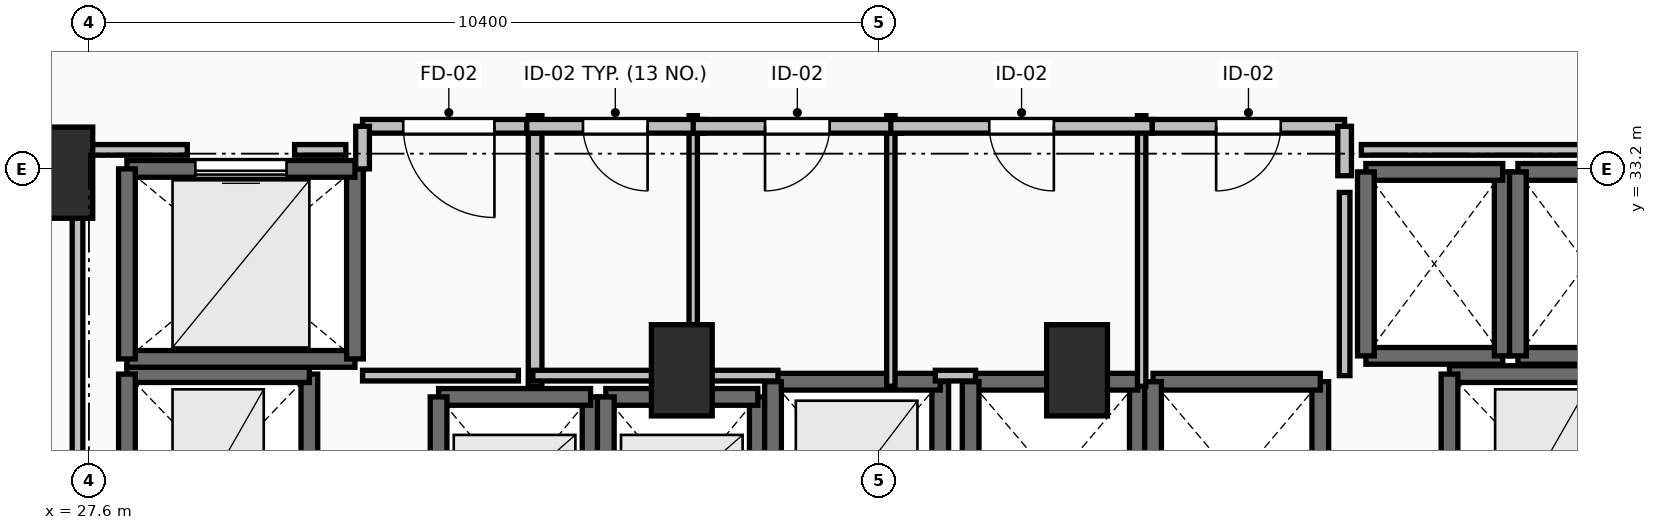
"""IFC4 building model, lengths in metres.
Left out: names, types, materials, properties, quantities, classifications, styles, units other than length and angle.
Written with IfcOpenShell. Run it as: python <this file> out.ifc"""

import sys

from ifc_helpers import new_model, si_unit, direction, frame, frame_2d, origin, origin_2d, place, context, subcontext, project, spatial, rectangle, extrude, element, fill, save


model = new_model("IFC4")
c1 = context("Model", 3, precision=1e-05, world=origin(), true_north=direction((0.0, 1.0)))
c2 = subcontext(c1, "Body", "Model", "MODEL_VIEW")
j1 = project(units=[si_unit("LENGTHUNIT", "METRE"), si_unit("PLANEANGLEUNIT", "RADIAN")], contexts=[c1])
p1 = place(None, origin())
s1 = spatial("IfcSite", under=j1, at=p1, CompositionType="ELEMENT")
p2 = place(p1, origin())
s2 = spatial("IfcBuilding", under=s1, at=p2, CompositionType="ELEMENT")
p3 = place(p2, frame((0.0, 0.0, 99.8)))
s3 = spatial("IfcBuildingStorey", under=s2, at=p3, CompositionType="ELEMENT", Elevation=99.8)
for number, where, z_axis, x_axis in (
    (1, (27.25, 33.15, 0.0), (0.0, 0.0, 1.0), (1.0, 0.0, 0.0)),
    (2, (35.4, 30.55, 0.0), (0.0, 0.0, 1.0), (1.0, 0.0, 0.0)),
    (3, (40.6, 30.55, 0.0), (0.0, 0.0, 1.0), (1.0, 0.0, 0.0)),
):
    element("IfcColumn", number, at=place(p3, frame(where, z_axis=z_axis, x_axis=x_axis)), inside=s3, PredefinedType="PILASTER", context=c2, shape_type="SweptSolid", body=[
        extrude(rectangle(XDim=0.8, YDim=1.2, at=origin_2d()), origin(), (0.0, 0.0, 1.0), 3.5),
    ])
p4 = place(p3, frame((34.2, 27.8, 0.0), z_axis=(0.0, 0.0, 1.0), x_axis=(0.0, 1.0, 0.0)))
e4 = element("IfcWall", 4, at=p4, inside=s3, PredefinedType="SOLIDWALL", context=c2, shape_type="SweptSolid", body=[
    extrude(rectangle(XDim=2.4, YDim=0.22, at=frame_2d((1.2, 0.0))), origin(), (0.0, 0.0, 1.0), 3.24),
])
p5 = place(p3, frame((34.2, 30.2, 0.0), z_axis=(0.0, 0.0, 1.0), x_axis=(-1.0, 0.0, 0.0)))
e5 = element("IfcWall", 5, at=p5, inside=s3, PredefinedType="SOLIDWALL", context=c2, shape_type="SweptSolid", body=[
    extrude(rectangle(XDim=2.0, YDim=0.22, at=frame_2d((1.0, 0.0))), origin(), (0.0, 0.0, 1.0), 3.24),
])
for number, where, z_axis, x_axis in (
    (6, (32.2, 30.2, 0.0), (0.0, 0.0, 1.0), (0.0, -1.0, 0.0)),
    (7, (36.4, 27.8, 0.0), (0.0, 0.0, 1.0), (0.0, 1.0, 0.0)),
):
    element("IfcWall", number, at=place(p3, frame(where, z_axis=z_axis, x_axis=x_axis)), inside=s3, PredefinedType="SOLIDWALL", context=c2, shape_type="SweptSolid", body=[
        extrude(rectangle(XDim=2.4, YDim=0.22, at=frame_2d((1.2, 0.0))), origin(), (0.0, 0.0, 1.0), 3.24),
    ])
p6 = place(p3, frame((36.4, 30.2, 0.0), z_axis=(0.0, 0.0, 1.0), x_axis=(-1.0, 0.0, 0.0)))
e8 = element("IfcWall", 8, at=p6, inside=s3, PredefinedType="SOLIDWALL", context=c2, shape_type="SweptSolid", body=[
    extrude(rectangle(XDim=2.0, YDim=0.22, at=frame_2d((1.0, 0.0))), origin(), (0.0, 0.0, 1.0), 3.24),
])
p7 = place(p3, frame((34.4, 30.2, 0.0), z_axis=(0.0, 0.0, 1.0), x_axis=(0.0, -1.0, 0.0)))
e9 = element("IfcWall", 9, at=p7, inside=s3, PredefinedType="SOLIDWALL", context=c2, shape_type="SweptSolid", body=[
    extrude(rectangle(XDim=2.4, YDim=0.22, at=frame_2d((1.2, 0.0))), origin(), (0.0, 0.0, 1.0), 3.24),
])
p8 = place(p3, frame((38.8, 27.8, 0.0), z_axis=(0.0, 0.0, 1.0), x_axis=(0.0, 1.0, 0.0)))
e10 = element("IfcWall", 10, at=p8, inside=s3, PredefinedType="SOLIDWALL", context=c2, shape_type="SweptSolid", body=[
    extrude(rectangle(XDim=2.6, YDim=0.22, at=frame_2d((1.3, 0.0))), origin(), (0.0, 0.0, 1.0), 3.24),
])
p9 = place(p3, frame((38.8, 30.4, 0.0), z_axis=(0.0, 0.0, 1.0), x_axis=(-1.0, 0.0, 0.0)))
e11 = element("IfcWall", 11, at=p9, inside=s3, PredefinedType="SOLIDWALL", context=c2, shape_type="SweptSolid", body=[
    extrude(rectangle(XDim=2.2, YDim=0.22, at=frame_2d((1.1, 0.0))), origin(), (0.0, 0.0, 1.0), 3.24),
])
for number, where, z_axis, x_axis in (
    (12, (36.6, 30.4, 0.0), (0.0, 0.0, 1.0), (0.0, -1.0, 0.0)),
    (13, (41.4, 27.8, 0.0), (0.0, 0.0, 1.0), (0.0, 1.0, 0.0)),
):
    element("IfcWall", number, at=place(p3, frame(where, z_axis=z_axis, x_axis=x_axis)), inside=s3, PredefinedType="SOLIDWALL", context=c2, shape_type="SweptSolid", body=[
        extrude(rectangle(XDim=2.6, YDim=0.22, at=frame_2d((1.3, 0.0))), origin(), (0.0, 0.0, 1.0), 3.24),
    ])
p10 = place(p3, frame((41.4, 30.4, 0.0), z_axis=(0.0, 0.0, 1.0), x_axis=(-1.0, 0.0, 0.0)))
e14 = element("IfcWall", 14, at=p10, inside=s3, PredefinedType="SOLIDWALL", context=c2, shape_type="SweptSolid", body=[
    extrude(rectangle(XDim=2.2, YDim=0.22, at=frame_2d((1.1, 0.0))), origin(), (0.0, 0.0, 1.0), 3.24),
])
for number, where, z_axis, x_axis in (
    (15, (39.2, 30.4, 0.0), (0.0, 0.0, 1.0), (0.0, -1.0, 0.0)),
    (16, (43.8, 27.8, 0.0), (0.0, 0.0, 1.0), (0.0, 1.0, 0.0)),
):
    element("IfcWall", number, at=place(p3, frame(where, z_axis=z_axis, x_axis=x_axis)), inside=s3, PredefinedType="SOLIDWALL", context=c2, shape_type="SweptSolid", body=[
        extrude(rectangle(XDim=2.6, YDim=0.22, at=frame_2d((1.3, 0.0))), origin(), (0.0, 0.0, 1.0), 3.24),
    ])
p11 = place(p3, frame((43.8, 30.4, 0.0), z_axis=(0.0, 0.0, 1.0), x_axis=(-1.0, 0.0, 0.0)))
e17 = element("IfcWall", 17, at=p11, inside=s3, PredefinedType="SOLIDWALL", context=c2, shape_type="SweptSolid", body=[
    extrude(rectangle(XDim=2.2, YDim=0.22, at=frame_2d((1.1, 0.0))), origin(), (0.0, 0.0, 1.0), 3.24),
])
p12 = place(p3, frame((41.6, 30.4, 0.0), z_axis=(0.0, 0.0, 1.0), x_axis=(0.0, -1.0, 0.0)))
e18 = element("IfcWall", 18, at=p12, inside=s3, PredefinedType="SOLIDWALL", context=c2, shape_type="SweptSolid", body=[
    extrude(rectangle(XDim=2.6, YDim=0.22, at=frame_2d((1.3, 0.0))), origin(), (0.0, 0.0, 1.0), 3.24),
])
p13 = place(p3, frame((44.4, 30.74, 0.0), z_axis=(0.0, 0.0, 1.0), x_axis=(1.0, 0.0, 0.0)))
e19 = element("IfcWall", 19, at=p13, inside=s3, PredefinedType="SOLIDWALL", context=c2, shape_type="SweptSolid", body=[
    extrude(rectangle(XDim=1.8, YDim=0.22, at=frame_2d((0.9, 0.0))), origin(), (0.0, 0.0, 1.0), 3.24),
])
p14 = place(p3, frame((46.2, 30.74, 0.0), z_axis=(0.0, 0.0, 1.0), x_axis=(0.0, 1.0, 0.0)))
e20 = element("IfcWall", 20, at=p14, inside=s3, PredefinedType="SOLIDWALL", context=c2, shape_type="SweptSolid", body=[
    extrude(rectangle(XDim=2.42, YDim=0.22, at=frame_2d((1.21, 0.0))), origin(), (0.0, 0.0, 1.0), 3.24),
])
p15 = place(p3, frame((46.2, 33.16, 0.0), z_axis=(0.0, 0.0, 1.0), x_axis=(-1.0, 0.0, 0.0)))
e21 = element("IfcWall", 21, at=p15, inside=s3, PredefinedType="SOLIDWALL", context=c2, shape_type="SweptSolid", body=[
    extrude(rectangle(XDim=1.8, YDim=0.22, at=frame_2d((0.9, 0.0))), origin(), (0.0, 0.0, 1.0), 3.24),
])
p16 = place(p3, frame((44.4, 33.16, 0.0), z_axis=(0.0, 0.0, 1.0), x_axis=(0.0, -1.0, 0.0)))
e22 = element("IfcWall", 22, at=p16, inside=s3, PredefinedType="SOLIDWALL", context=c2, shape_type="SweptSolid", body=[
    extrude(rectangle(XDim=2.42, YDim=0.22, at=frame_2d((1.21, 0.0))), origin(), (0.0, 0.0, 1.0), 3.24),
])
for number, where, z_axis, x_axis in (
    (23, (46.4, 30.74, 0.0), (0.0, 0.0, 1.0), (1.0, 0.0, 0.0)),
    (24, (48.2, 33.16, 0.0), (0.0, 0.0, 1.0), (-1.0, 0.0, 0.0)),
):
    element("IfcWall", number, at=place(p3, frame(where, z_axis=z_axis, x_axis=x_axis)), inside=s3, PredefinedType="SOLIDWALL", context=c2, shape_type="SweptSolid", body=[
        extrude(rectangle(XDim=1.8, YDim=0.22, at=frame_2d((0.9, 0.0))), origin(), (0.0, 0.0, 1.0), 3.24),
    ])
p17 = place(p3, frame((46.4, 33.16, 0.0), z_axis=(0.0, 0.0, 1.0), x_axis=(0.0, -1.0, 0.0)))
e25 = element("IfcWall", 25, at=p17, inside=s3, PredefinedType="SOLIDWALL", context=c2, shape_type="SweptSolid", body=[
    extrude(rectangle(XDim=2.42, YDim=0.22, at=frame_2d((1.21, 0.0))), origin(), (0.0, 0.0, 1.0), 3.24),
])
p18 = place(p3, frame((30.5, 28.0, 0.0), z_axis=(0.0, 0.0, 1.0), x_axis=(0.0, 1.0, 0.0)))
e26 = element("IfcWall", 26, at=p18, inside=s3, PredefinedType="SHEAR", context=c2, shape_type="SweptSolid", body=[
    extrude(rectangle(XDim=2.5, YDim=0.22, at=frame_2d((1.25, 0.0))), origin(), (0.0, 0.0, 1.0), 3.24),
])
p19 = place(p3, frame((30.5, 30.5, 0.0), z_axis=(0.0, 0.0, 1.0), x_axis=(-1.0, 0.0, 0.0)))
e27 = element("IfcWall", 27, at=p19, inside=s3, PredefinedType="SHEAR", context=c2, shape_type="SweptSolid", body=[
    extrude(rectangle(XDim=2.4, YDim=0.22, at=frame_2d((1.2, 0.0))), origin(), (0.0, 0.0, 1.0), 3.24),
])
p20 = place(p3, frame((28.1, 30.5, 0.0), z_axis=(0.0, 0.0, 1.0), x_axis=(0.0, -1.0, 0.0)))
e28 = element("IfcWall", 28, at=p20, inside=s3, PredefinedType="SHEAR", context=c2, shape_type="SweptSolid", body=[
    extrude(rectangle(XDim=2.5, YDim=0.22, at=frame_2d((1.25, 0.0))), origin(), (0.0, 0.0, 1.0), 3.24),
])
p21 = place(p3, frame((47.9, 30.5, 0.0), z_axis=(0.0, 0.0, 1.0), x_axis=(-1.0, 0.0, 0.0)))
e29 = element("IfcWall", 29, at=p21, inside=s3, PredefinedType="SHEAR", context=c2, shape_type="SweptSolid", body=[
    extrude(rectangle(XDim=2.4, YDim=0.22, at=frame_2d((1.2, 0.0))), origin(), (0.0, 0.0, 1.0), 3.24),
])
p22 = place(p3, frame((45.5, 30.5, 0.0), z_axis=(0.0, 0.0, 1.0), x_axis=(0.0, -1.0, 0.0)))
e30 = element("IfcWall", 30, at=p22, inside=s3, PredefinedType="SHEAR", context=c2, shape_type="SweptSolid", body=[
    extrude(rectangle(XDim=2.5, YDim=0.22, at=frame_2d((1.25, 0.0))), origin(), (0.0, 0.0, 1.0), 3.24),
])
p23 = place(p3, frame((28.1, 30.7, 0.0), z_axis=(0.0, 0.0, 1.0), x_axis=(1.0, 0.0, 0.0)))
e31 = element("IfcWall", 31, at=p23, inside=s3, PredefinedType="SOLIDWALL", context=c2, shape_type="SweptSolid", body=[
    extrude(rectangle(XDim=3.0, YDim=0.22, at=frame_2d((1.5, 0.0))), origin(), (0.0, 0.0, 1.0), 3.24),
])
p24 = place(p3, frame((31.1, 30.7, 0.0), z_axis=(0.0, 0.0, 1.0), x_axis=(0.0, 1.0, 0.0)))
e32 = element("IfcWall", 32, at=p24, inside=s3, PredefinedType="SOLIDWALL", context=c2, shape_type="SweptSolid", body=[
    extrude(rectangle(XDim=2.5, YDim=0.22, at=frame_2d((1.25, 0.0))), origin(), (0.0, 0.0, 1.0), 3.24),
])
p25 = place(p3, frame((31.1, 33.2, 0.0), z_axis=(0.0, 0.0, 1.0), x_axis=(-1.0, 0.0, 0.0)))
e33 = element("IfcWall", 33, at=p25, inside=s3, PredefinedType="SOLIDWALL", context=c2, shape_type="SweptSolid", body=[
    extrude(rectangle(XDim=3.0, YDim=0.22, at=frame_2d((1.5, 0.0))), origin(), (0.0, 0.0, 1.0), 3.24),
])
p26 = place(p25, frame((0.9, 0.0, 0.0)))
e34 = element("IfcOpeningElement", 34, at=p26, cuts=e33, PredefinedType="OPENING", context=c2, shape_type="SweptSolid", body=[
    extrude(rectangle(XDim=1.2, YDim=2.2, at=frame_2d((0.6, 1.1))), frame((0.0, 0.125, 0.0), z_axis=(0.0, -1.0, 0.0), x_axis=(1.0, 0.0, 0.0)), (0.0, 0.0, 1.0), 0.25),
])
p27 = place(p3, frame((28.1, 33.2, 0.0), z_axis=(0.0, 0.0, 1.0), x_axis=(0.0, -1.0, 0.0)))
e35 = element("IfcWall", 35, at=p27, inside=s3, PredefinedType="SOLIDWALL", context=c2, shape_type="SweptSolid", body=[
    extrude(rectangle(XDim=2.5, YDim=0.22, at=frame_2d((1.25, 0.0))), origin(), (0.0, 0.0, 1.0), 3.24),
])
p28 = place(p3, frame((33.47, 30.34, 0.0), z_axis=(0.0, 0.0, 1.0), x_axis=(0.0, 1.0, 0.0)))
e36 = element("IfcWall", 36, at=p28, inside=s3, PredefinedType="PARTITIONING", context=c2, shape_type="SweptSolid", body=[
    extrude(rectangle(XDim=3.56, YDim=0.18, at=frame_2d((1.78, 0.0))), origin(), (0.0, 0.0, 1.0), 3.24),
])
p29 = place(p3, frame((33.47, 33.76, 0.0), z_axis=(0.0, 0.0, 1.0), x_axis=(-1.0, 0.0, 0.0)))
e37 = element("IfcWall", 37, at=p29, inside=s3, PredefinedType="PARTITIONING", context=c2, shape_type="SweptSolid", body=[
    extrude(rectangle(XDim=2.27, YDim=0.18, at=frame_2d((1.135, 0.0))), origin(), (0.0, 0.0, 1.0), 3.24),
])
p30 = place(p29, frame((0.535, 0.0, 0.0)))
e38 = element("IfcOpeningElement", 38, at=p30, cuts=e37, PredefinedType="OPENING", context=c2, shape_type="SweptSolid", body=[
    extrude(rectangle(XDim=1.2, YDim=2.15, at=frame_2d((0.6, 1.075))), frame((0.0, 0.105, 0.0), z_axis=(0.0, -1.0, 0.0), x_axis=(1.0, 0.0, 0.0)), (0.0, 0.0, 1.0), 0.21),
])
p31 = place(p3, frame((31.2, 33.76, 0.0), z_axis=(0.0, 0.0, 1.0), x_axis=(0.0, -1.0, 0.0)))
e39 = element("IfcWall", 39, at=p31, inside=s3, PredefinedType="PARTITIONING", context=c2, shape_type="SweptSolid", body=[
    extrude(rectangle(XDim=0.56, YDim=0.18, at=frame_2d((0.28, 0.0))), origin(), (0.0, 0.0, 1.0), 3.24),
])
p32 = place(p3, frame((35.55, 30.34, 0.0), z_axis=(0.0, 0.0, 1.0), x_axis=(0.0, 1.0, 0.0)))
e40 = element("IfcWall", 40, at=p32, inside=s3, PredefinedType="PARTITIONING", context=c2, shape_type="SweptSolid", body=[
    extrude(rectangle(XDim=3.56, YDim=0.11, at=frame_2d((1.78, 0.0))), origin(), (0.0, 0.0, 1.0), 2.432),
])
p33 = place(p3, frame((35.69, 33.76, 0.0), z_axis=(0.0, 0.0, 1.0), x_axis=(-1.0, 0.0, 0.0)))
e41 = element("IfcWall", 41, at=p33, inside=s3, PredefinedType="PARTITIONING", context=c2, shape_type="SweptSolid", body=[
    extrude(rectangle(XDim=2.33, YDim=0.18, at=frame_2d((1.165, 0.0))), origin(), (0.0, 0.0, 1.0), 3.24),
])
p34 = place(p33, frame((0.74, 0.0, 0.0)))
e42 = element("IfcOpeningElement", 42, at=p34, cuts=e41, PredefinedType="OPENING", context=c2, shape_type="SweptSolid", body=[
    extrude(rectangle(XDim=0.85, YDim=2.1, at=frame_2d((0.425, 1.05))), frame((0.0, 0.105, 0.0), z_axis=(0.0, -1.0, 0.0), x_axis=(1.0, 0.0, 0.0)), (0.0, 0.0, 1.0), 0.21),
])
p35 = place(p3, frame((38.15, 30.34, 0.0), z_axis=(0.0, 0.0, 1.0), x_axis=(0.0, 1.0, 0.0)))
e43 = element("IfcWall", 43, at=p35, inside=s3, PredefinedType="PARTITIONING", context=c2, shape_type="SweptSolid", body=[
    extrude(rectangle(XDim=3.56, YDim=0.11, at=frame_2d((1.78, 0.0))), origin(), (0.0, 0.0, 1.0), 2.432),
])
p36 = place(p3, frame((38.29, 33.76, 0.0), z_axis=(0.0, 0.0, 1.0), x_axis=(-1.0, 0.0, 0.0)))
e44 = element("IfcWall", 44, at=p36, inside=s3, PredefinedType="PARTITIONING", context=c2, shape_type="SweptSolid", body=[
    extrude(rectangle(XDim=2.74, YDim=0.18, at=frame_2d((1.37, 0.0))), origin(), (0.0, 0.0, 1.0), 3.24),
])
p37 = place(p36, frame((0.945, 0.0, 0.0)))
e45 = element("IfcOpeningElement", 45, at=p37, cuts=e44, PredefinedType="OPENING", context=c2, shape_type="SweptSolid", body=[
    extrude(rectangle(XDim=0.85, YDim=2.1, at=frame_2d((0.425, 1.05))), frame((0.0, 0.105, 0.0), z_axis=(0.0, -1.0, 0.0), x_axis=(1.0, 0.0, 0.0)), (0.0, 0.0, 1.0), 0.21),
])
p38 = place(p3, frame((41.45, 30.34, 0.0), z_axis=(0.0, 0.0, 1.0), x_axis=(0.0, 1.0, 0.0)))
e46 = element("IfcWall", 46, at=p38, inside=s3, PredefinedType="PARTITIONING", context=c2, shape_type="SweptSolid", body=[
    extrude(rectangle(XDim=3.56, YDim=0.11, at=frame_2d((1.78, 0.0))), origin(), (0.0, 0.0, 1.0), 3.24),
])
p39 = place(p3, frame((41.59, 33.76, 0.0), z_axis=(0.0, 0.0, 1.0), x_axis=(-1.0, 0.0, 0.0)))
e47 = element("IfcWall", 47, at=p39, inside=s3, PredefinedType="PARTITIONING", context=c2, shape_type="SweptSolid", body=[
    extrude(rectangle(XDim=3.44, YDim=0.18, at=frame_2d((1.72, 0.0))), origin(), (0.0, 0.0, 1.0), 3.24),
])
p40 = place(p39, frame((1.295, 0.0, 0.0)))
e48 = element("IfcOpeningElement", 48, at=p40, cuts=e47, PredefinedType="OPENING", context=c2, shape_type="SweptSolid", body=[
    extrude(rectangle(XDim=0.85, YDim=2.1, at=frame_2d((0.425, 1.05))), frame((0.0, 0.105, 0.0), z_axis=(0.0, -1.0, 0.0), x_axis=(1.0, 0.0, 0.0)), (0.0, 0.0, 1.0), 0.21),
])
p41 = place(p3, frame((44.12, 33.76, 0.0), z_axis=(0.0, 0.0, 1.0), x_axis=(-1.0, 0.0, 0.0)))
e49 = element("IfcWall", 49, at=p41, inside=s3, PredefinedType="PARTITIONING", context=c2, shape_type="SweptSolid", body=[
    extrude(rectangle(XDim=2.53, YDim=0.18, at=frame_2d((1.265, 0.0))), origin(), (0.0, 0.0, 1.0), 3.24),
])
p42 = place(p41, frame((0.84, 0.0, 0.0)))
e50 = element("IfcOpeningElement", 50, at=p42, cuts=e49, PredefinedType="OPENING", context=c2, shape_type="SweptSolid", body=[
    extrude(rectangle(XDim=0.85, YDim=2.1, at=frame_2d((0.425, 1.05))), frame((0.0, 0.105, 0.0), z_axis=(0.0, -1.0, 0.0), x_axis=(1.0, 0.0, 0.0)), (0.0, 0.0, 1.0), 0.21),
])
p43 = place(p3, frame((44.12, 33.11, 0.0), z_axis=(0.0, 0.0, 1.0), x_axis=(0.0, 1.0, 0.0)))
e51 = element("IfcWall", 51, at=p43, inside=s3, PredefinedType="PARTITIONING", context=c2, shape_type="SweptSolid", body=[
    extrude(rectangle(XDim=0.65, YDim=0.18, at=frame_2d((0.325, 0.0))), origin(), (0.0, 0.0, 1.0), 3.24),
])
p44 = place(p3, frame((31.2, 30.48, 0.0), z_axis=(0.0, 0.0, 1.0), x_axis=(1.0, 0.0, 0.0)))
e52 = element("IfcWall", 52, at=p44, inside=s3, PredefinedType="PARTITIONING", context=c2, shape_type="SweptSolid", body=[
    extrude(rectangle(XDim=2.05, YDim=0.14, at=frame_2d((1.025, 0.0))), origin(), (0.0, 0.0, 1.0), 3.24),
])
p45 = place(p3, frame((33.44, 30.48, 0.0), z_axis=(0.0, 0.0, 1.0), x_axis=(1.0, 0.0, 0.0)))
e53 = element("IfcWall", 53, at=p45, inside=s3, PredefinedType="PARTITIONING", context=c2, shape_type="SweptSolid", body=[
    extrude(rectangle(XDim=2.14, YDim=0.14, at=frame_2d((1.07, 0.0))), origin(), (0.0, 0.0, 1.0), 2.432),
])
p46 = place(p3, frame((35.6, 30.48, 0.0), z_axis=(0.0, 0.0, 1.0), x_axis=(1.0, 0.0, 0.0)))
e54 = element("IfcWall", 54, at=p46, inside=s3, PredefinedType="PARTITIONING", context=c2, shape_type="SweptSolid", body=[
    extrude(rectangle(XDim=1.065, YDim=0.14, at=frame_2d((0.532, 0.0))), origin(), (0.0, 0.0, 1.0), 2.432),
])
p47 = place(p3, frame((38.735, 30.48, 0.0), z_axis=(0.0, 0.0, 1.0), x_axis=(1.0, 0.0, 0.0)))
e55 = element("IfcWall", 55, at=p47, inside=s3, PredefinedType="PARTITIONING", context=c2, shape_type="SweptSolid", body=[
    extrude(rectangle(XDim=0.53, YDim=0.14, at=frame_2d((0.265, 0.0))), origin(), (0.0, 0.0, 1.0), 2.432),
])
p48 = place(p3, frame((44.12, 30.48, 0.0), z_axis=(0.0, 0.0, 1.0), x_axis=(0.0, 1.0, 0.0)))
e56 = element("IfcWall", 56, at=p48, inside=s3, PredefinedType="PARTITIONING", context=c2, shape_type="SweptSolid", body=[
    extrude(rectangle(XDim=2.41, YDim=0.14, at=frame_2d((1.205, 0.0))), origin(), (0.0, 0.0, 1.0), 3.24),
])
p49 = place(p3, frame((44.34, 33.45, 0.0), z_axis=(0.0, 0.0, 1.0), x_axis=(1.0, 0.0, 0.0)))
e57 = element("IfcWall", 57, at=p49, inside=s3, PredefinedType="PARTITIONING", context=c2, shape_type="SweptSolid", body=[
    extrude(rectangle(XDim=4.21, YDim=0.14, at=frame_2d((2.105, 0.0))), origin(), (0.0, 0.0, 1.0), 2.432),
])
p50 = place(p3, frame((27.45, 28.196, 0.0), z_axis=(0.0, 0.0, 1.0), x_axis=(0.0, 1.0, 0.0)))
e58 = element("IfcWall", 58, at=p50, inside=s3, PredefinedType="PARTITIONING", context=c2, shape_type="SweptSolid", body=[
    extrude(rectangle(XDim=5.254, YDim=0.14, at=frame_2d((2.627, 0.0))), origin(), (0.0, 0.0, 1.0), 2.432),
])
p51 = place(p3, frame((27.45, 33.45, 0.0), z_axis=(0.0, 0.0, 1.0), x_axis=(1.0, 0.0, 0.0)))
e59 = element("IfcWall", 59, at=p51, inside=s3, PredefinedType="PARTITIONING", context=c2, shape_type="SweptSolid", body=[
    extrude(rectangle(XDim=1.444, YDim=0.14, at=frame_2d((0.722, 0.0))), origin(), (0.0, 0.0, 1.0), 2.432),
])
p52 = place(p3, frame((30.306, 33.45, 0.0), z_axis=(0.0, 0.0, 1.0), x_axis=(1.0, 0.0, 0.0)))
e60 = element("IfcWall", 60, at=p52, inside=s3, PredefinedType="PARTITIONING", context=c2, shape_type="SweptSolid", body=[
    extrude(rectangle(XDim=0.674, YDim=0.14, at=frame_2d((0.337, 0.0))), origin(), (0.0, 0.0, 1.0), 3.24),
])
p53 = place(p26, origin())
e61 = element("IfcDoor", 61, at=p53, inside=s3, OperationType="SLIDING_TO_LEFT", PredefinedType="DOOR", context=c2, shape_type="SweptSolid", body=[
    extrude(rectangle(XDim=1.2, YDim=2.2, at=frame_2d((0.6, 1.1))), frame((0.0, 0.025, 0.0), z_axis=(0.0, -1.0, 0.0), x_axis=(1.0, 0.0, 0.0)), (0.0, 0.0, 1.0), 0.05),
])
fill(e34, e61)
p54 = place(p30, origin())
e62 = element("IfcDoor", 62, at=p54, inside=s3, OperationType="SINGLE_SWING_LEFT", PredefinedType="DOOR", context=c2, shape_type="SweptSolid", body=[
    extrude(rectangle(XDim=1.2, YDim=2.15, at=frame_2d((0.6, 1.075))), frame((0.0, 0.025, 0.0), z_axis=(0.0, -1.0, 0.0), x_axis=(1.0, 0.0, 0.0)), (0.0, 0.0, 1.0), 0.05),
])
fill(e38, e62)
p55 = place(p34, origin())
e63 = element("IfcDoor", 63, at=p55, inside=s3, OperationType="SINGLE_SWING_LEFT", PredefinedType="DOOR", context=c2, shape_type="SweptSolid", body=[
    extrude(rectangle(XDim=0.85, YDim=2.1, at=frame_2d((0.425, 1.05))), frame((0.0, 0.025, 0.0), z_axis=(0.0, -1.0, 0.0), x_axis=(1.0, 0.0, 0.0)), (0.0, 0.0, 1.0), 0.05),
])
fill(e42, e63)
p56 = place(p37, origin())
e64 = element("IfcDoor", 64, at=p56, inside=s3, OperationType="SINGLE_SWING_RIGHT", PredefinedType="DOOR", context=c2, shape_type="SweptSolid", body=[
    extrude(rectangle(XDim=0.85, YDim=2.1, at=frame_2d((0.425, 1.05))), frame((0.0, 0.025, 0.0), z_axis=(0.0, -1.0, 0.0), x_axis=(1.0, 0.0, 0.0)), (0.0, 0.0, 1.0), 0.05),
])
fill(e45, e64)
p57 = place(p40, origin())
e65 = element("IfcDoor", 65, at=p57, inside=s3, OperationType="SINGLE_SWING_LEFT", PredefinedType="DOOR", context=c2, shape_type="SweptSolid", body=[
    extrude(rectangle(XDim=0.85, YDim=2.1, at=frame_2d((0.425, 1.05))), frame((0.0, 0.025, 0.0), z_axis=(0.0, -1.0, 0.0), x_axis=(1.0, 0.0, 0.0)), (0.0, 0.0, 1.0), 0.05),
])
fill(e48, e65)
p58 = place(p42, origin())
e66 = element("IfcDoor", 66, at=p58, inside=s3, OperationType="SINGLE_SWING_RIGHT", PredefinedType="DOOR", context=c2, shape_type="SweptSolid", body=[
    extrude(rectangle(XDim=0.85, YDim=2.1, at=frame_2d((0.425, 1.05))), frame((0.0, 0.025, 0.0), z_axis=(0.0, -1.0, 0.0), x_axis=(1.0, 0.0, 0.0)), (0.0, 0.0, 1.0), 0.05),
])
fill(e50, e66)
save(model, sys.argv[1])
